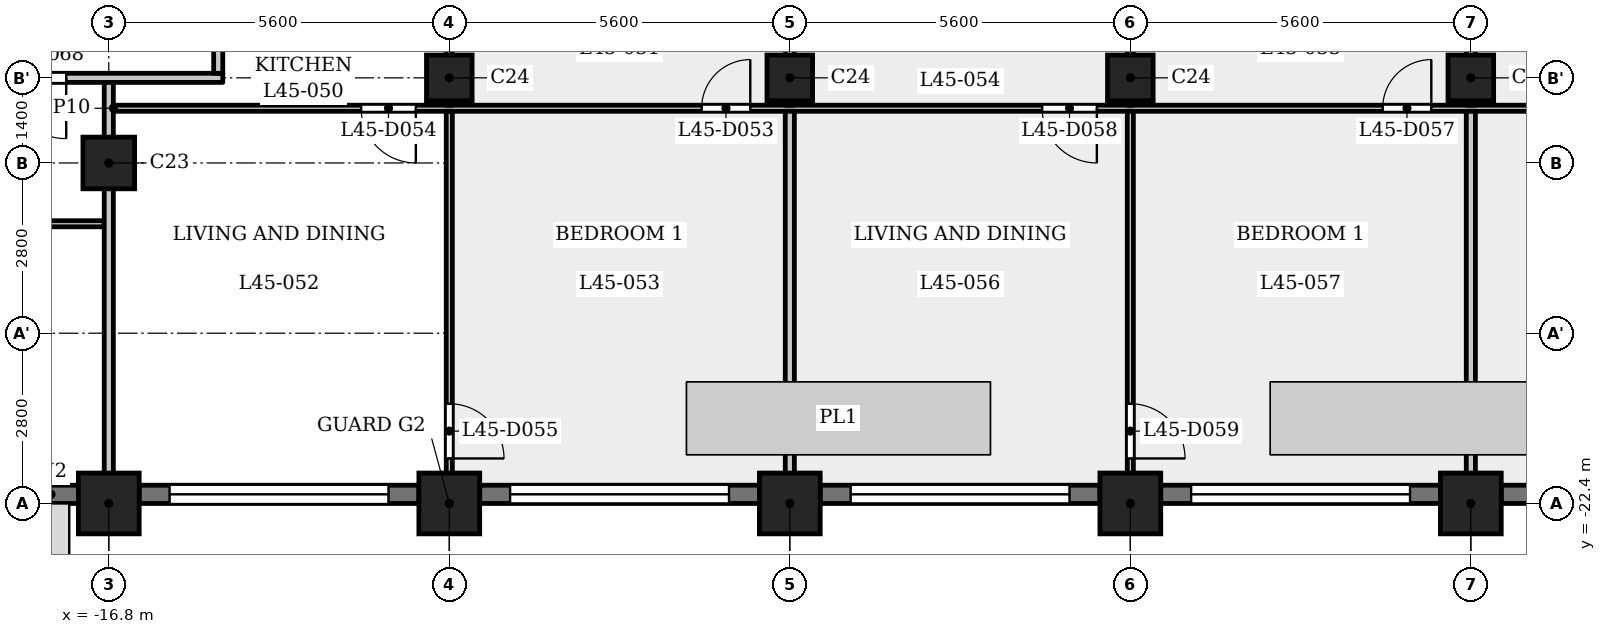
"""IFC4 building model, lengths in metres.
Left out: names, types, materials, properties, quantities, classifications, styles, units other than length and angle.
Written with IfcOpenShell. Run it as: python <this file> out.ifc"""

import sys

from ifc_helpers import new_model, si_unit, direction, frame, frame_2d, origin, origin_2d, place, context, subcontext, project, spatial, rectangle, extrude, element, fill, save


model = new_model("IFC4")
c1 = context("Model", 3, precision=1e-05, world=origin(), true_north=direction((0.0, 1.0)))
c2 = subcontext(c1, "Body", "Model", "MODEL_VIEW")
j1 = project(units=[si_unit("LENGTHUNIT", "METRE"), si_unit("PLANEANGLEUNIT", "RADIAN")], contexts=[c1])
p1 = place(None, origin())
s1 = spatial("IfcSite", under=j1, at=p1, CompositionType="ELEMENT")
p2 = place(p1, origin())
s2 = spatial("IfcBuilding", under=s1, at=p2, CompositionType="ELEMENT")
p3 = place(p2, frame((0.0, 0.0, 174.6)))
s3 = spatial("IfcBuildingStorey", under=s2, at=p3, CompositionType="ELEMENT", Elevation=174.6)
for number, where, z_axis, x_axis in (
    (1, (-16.8, -22.4, 0.0), (0.0, 0.0, 1.0), (1.0, 0.0, 0.0)),
    (2, (-11.2, -22.4, 0.0), (0.0, 0.0, 1.0), (1.0, 0.0, 0.0)),
    (3, (-5.6, -22.4, 0.0), (0.0, 0.0, 1.0), (1.0, 0.0, 0.0)),
    (4, (0.0, -22.4, 0.0), (0.0, 0.0, 1.0), (1.0, 0.0, 0.0)),
    (5, (5.6, -22.4, 0.0), (0.0, 0.0, 1.0), (1.0, 0.0, 0.0)),
):
    element("IfcColumn", number, at=place(p3, frame(where, z_axis=z_axis, x_axis=x_axis)), inside=s3, PredefinedType="COLUMN", context=c2, shape_type="SweptSolid", body=[
        extrude(rectangle(XDim=1.0, YDim=1.0, at=origin_2d()), origin(), (0.0, 0.0, 1.0), 3.5),
    ])
p4 = place(p3, frame((-16.8, -16.8, 0.0), z_axis=(0.0, 0.0, 1.0), x_axis=(1.0, 0.0, 0.0)))
e6 = element("IfcColumn", 6, at=p4, inside=s3, PredefinedType="COLUMN", context=c2, shape_type="SweptSolid", body=[
    extrude(rectangle(XDim=0.85, YDim=0.85, at=origin_2d()), origin(), (0.0, 0.0, 1.0), 3.5),
])
for number, where, z_axis, x_axis in (
    (7, (-11.2, -15.4, 0.0), (0.0, 0.0, 1.0), (1.0, 0.0, 0.0)),
    (8, (-5.6, -15.4, 0.0), (0.0, 0.0, 1.0), (1.0, 0.0, 0.0)),
    (9, (0.0, -15.4, 0.0), (0.0, 0.0, 1.0), (1.0, 0.0, 0.0)),
    (10, (5.6, -15.4, 0.0), (0.0, 0.0, 1.0), (1.0, 0.0, 0.0)),
):
    element("IfcColumn", number, at=place(p3, frame(where, z_axis=z_axis, x_axis=x_axis)), inside=s3, PredefinedType="COLUMN", context=c2, shape_type="SweptSolid", body=[
        extrude(rectangle(XDim=0.75, YDim=0.75, at=origin_2d()), origin(), (0.0, 0.0, 1.0), 3.5),
    ])
p5 = place(p3, frame((-20.0, -22.25, 0.0), z_axis=(0.0, 0.0, 1.0), x_axis=(1.0, 0.0, 0.0)))
e11 = element("IfcWall", 11, at=p5, inside=s3, PredefinedType="SOLIDWALL", context=c2, shape_type="SweptSolid", body=[
    extrude(rectangle(XDim=2.7, YDim=0.3, at=frame_2d((1.35, 0.0))), origin(), (0.0, 0.0, 1.0), 2.4),
])
p6 = place(p5, frame((0.45, 0.0, 0.9)))
e12 = element("IfcOpeningElement", 12, at=p6, cuts=e11, PredefinedType="OPENING", context=c2, shape_type="SweptSolid", body=[
    extrude(rectangle(XDim=1.8, YDim=1.25, at=frame_2d((0.9, 0.625))), frame((0.0, 0.16, 0.0), z_axis=(0.0, -1.0, 0.0), x_axis=(1.0, 0.0, 0.0)), (0.0, 0.0, 1.0), 0.32),
])
p7 = place(p3, frame((-16.3, -22.25, 0.0), z_axis=(0.0, 0.0, 1.0), x_axis=(1.0, 0.0, 0.0)))
e13 = element("IfcWall", 13, at=p7, inside=s3, PredefinedType="SOLIDWALL", context=c2, shape_type="SweptSolid", body=[
    extrude(rectangle(XDim=4.6, YDim=0.3, at=frame_2d((2.3, 0.0))), origin(), (0.0, 0.0, 1.0), 2.4),
])
p8 = place(p7, frame((0.5, 0.0, 1.2)))
e14 = element("IfcOpeningElement", 14, at=p8, cuts=e13, PredefinedType="OPENING", context=c2, shape_type="SweptSolid", body=[
    extrude(rectangle(XDim=3.6, YDim=0.95, at=frame_2d((1.8, 0.475))), frame((0.0, 0.16, 0.0), z_axis=(0.0, -1.0, 0.0), x_axis=(1.0, 0.0, 0.0)), (0.0, 0.0, 1.0), 0.32),
])
p9 = place(p3, frame((-10.7, -22.25, 0.0), z_axis=(0.0, 0.0, 1.0), x_axis=(1.0, 0.0, 0.0)))
e15 = element("IfcWall", 15, at=p9, inside=s3, PredefinedType="SOLIDWALL", context=c2, shape_type="SweptSolid", body=[
    extrude(rectangle(XDim=4.6, YDim=0.3, at=frame_2d((2.3, 0.0))), origin(), (0.0, 0.0, 1.0), 2.4),
])
p10 = place(p9, frame((0.5, 0.0, 1.2)))
e16 = element("IfcOpeningElement", 16, at=p10, cuts=e15, PredefinedType="OPENING", context=c2, shape_type="SweptSolid", body=[
    extrude(rectangle(XDim=3.6, YDim=0.95, at=frame_2d((1.8, 0.475))), frame((0.0, 0.16, 0.0), z_axis=(0.0, -1.0, 0.0), x_axis=(1.0, 0.0, 0.0)), (0.0, 0.0, 1.0), 0.32),
])
p11 = place(p3, frame((-5.1, -22.25, 0.0), z_axis=(0.0, 0.0, 1.0), x_axis=(1.0, 0.0, 0.0)))
e17 = element("IfcWall", 17, at=p11, inside=s3, PredefinedType="SOLIDWALL", context=c2, shape_type="SweptSolid", body=[
    extrude(rectangle(XDim=4.6, YDim=0.3, at=frame_2d((2.3, 0.0))), origin(), (0.0, 0.0, 1.0), 2.4),
])
p12 = place(p11, frame((0.5, 0.0, 1.2)))
e18 = element("IfcOpeningElement", 18, at=p12, cuts=e17, PredefinedType="OPENING", context=c2, shape_type="SweptSolid", body=[
    extrude(rectangle(XDim=3.6, YDim=0.95, at=frame_2d((1.8, 0.475))), frame((0.0, 0.16, 0.0), z_axis=(0.0, -1.0, 0.0), x_axis=(1.0, 0.0, 0.0)), (0.0, 0.0, 1.0), 0.32),
])
p13 = place(p3, frame((0.5, -22.25, 0.0), z_axis=(0.0, 0.0, 1.0), x_axis=(1.0, 0.0, 0.0)))
e19 = element("IfcWall", 19, at=p13, inside=s3, PredefinedType="SOLIDWALL", context=c2, shape_type="SweptSolid", body=[
    extrude(rectangle(XDim=4.6, YDim=0.3, at=frame_2d((2.3, 0.0))), origin(), (0.0, 0.0, 1.0), 2.4),
])
p14 = place(p13, frame((0.5, 0.0, 1.2)))
e20 = element("IfcOpeningElement", 20, at=p14, cuts=e19, PredefinedType="OPENING", context=c2, shape_type="SweptSolid", body=[
    extrude(rectangle(XDim=3.6, YDim=0.95, at=frame_2d((1.8, 0.475))), frame((0.0, 0.16, 0.0), z_axis=(0.0, -1.0, 0.0), x_axis=(1.0, 0.0, 0.0)), (0.0, 0.0, 1.0), 0.32),
])
p15 = place(p3, frame((6.1, -22.25, 0.0), z_axis=(0.0, 0.0, 1.0), x_axis=(1.0, 0.0, 0.0)))
e21 = element("IfcWall", 21, at=p15, inside=s3, PredefinedType="SOLIDWALL", context=c2, shape_type="SweptSolid", body=[
    extrude(rectangle(XDim=4.6, YDim=0.3, at=frame_2d((2.3, 0.0))), origin(), (0.0, 0.0, 1.0), 2.4),
])
p16 = place(p15, frame((0.5, 0.0, 1.2)))
e22 = element("IfcOpeningElement", 22, at=p16, cuts=e21, PredefinedType="OPENING", context=c2, shape_type="SweptSolid", body=[
    extrude(rectangle(XDim=3.6, YDim=0.95, at=frame_2d((1.8, 0.475))), frame((0.0, 0.16, 0.0), z_axis=(0.0, -1.0, 0.0), x_axis=(1.0, 0.0, 0.0)), (0.0, 0.0, 1.0), 0.32),
])
p17 = place(p3, frame((-26.394, -17.8, 0.0), z_axis=(0.0, 0.0, 1.0), x_axis=(1.0, 0.0, 0.0)))
e23 = element("IfcWall", 23, at=p17, inside=s3, PredefinedType="PARTITIONING", context=c2, shape_type="SweptSolid", body=[
    extrude(rectangle(XDim=9.519, YDim=0.1, at=frame_2d((4.76, 0.0))), origin(), (0.0, 0.0, 1.0), 3.15),
])
p18 = place(p17, frame((2.544, 0.0, 0.0)))
e24 = element("IfcOpeningElement", 24, at=p18, cuts=e23, PredefinedType="OPENING", context=c2, shape_type="SweptSolid", body=[
    extrude(rectangle(XDim=0.8, YDim=2.1, at=frame_2d((0.4, 1.05))), frame((0.0, 0.06, 0.0), z_axis=(0.0, -1.0, 0.0), x_axis=(1.0, 0.0, 0.0)), (0.0, 0.0, 1.0), 0.12),
])
p19 = place(p17, frame((6.894, 0.0, 0.0)))
e25 = element("IfcOpeningElement", 25, at=p19, cuts=e23, PredefinedType="OPENING", context=c2, shape_type="SweptSolid", body=[
    extrude(rectangle(XDim=0.9, YDim=2.1, at=frame_2d((0.45, 1.05))), frame((0.0, 0.06, 0.0), z_axis=(0.0, -1.0, 0.0), x_axis=(1.0, 0.0, 0.0)), (0.0, 0.0, 1.0), 0.12),
])
p20 = place(p3, frame((-16.725, -15.9, 0.0), z_axis=(0.0, 0.0, 1.0), x_axis=(1.0, 0.0, 0.0)))
e26 = element("IfcWall", 26, at=p20, inside=s3, PredefinedType="PARTITIONING", context=c2, shape_type="SweptSolid", body=[
    extrude(rectangle(XDim=33.45, YDim=0.1, at=frame_2d((16.725, 0.0))), origin(), (0.0, 0.0, 1.0), 3.15),
])
p21 = place(p20, frame((9.675, 0.0, 0.0)))
e27 = element("IfcOpeningElement", 27, at=p21, cuts=e26, PredefinedType="OPENING", context=c2, shape_type="SweptSolid", body=[
    extrude(rectangle(XDim=0.8, YDim=2.1, at=frame_2d((0.4, 1.05))), frame((0.0, 0.06, 0.0), z_axis=(0.0, -1.0, 0.0), x_axis=(1.0, 0.0, 0.0)), (0.0, 0.0, 1.0), 0.12),
])
p22 = place(p20, frame((4.075, 0.0, 0.0)))
e28 = element("IfcOpeningElement", 28, at=p22, cuts=e26, PredefinedType="OPENING", context=c2, shape_type="SweptSolid", body=[
    extrude(rectangle(XDim=0.9, YDim=2.1, at=frame_2d((0.45, 1.05))), frame((0.0, 0.06, 0.0), z_axis=(0.0, -1.0, 0.0), x_axis=(1.0, 0.0, 0.0)), (0.0, 0.0, 1.0), 0.12),
])
p23 = place(p20, frame((20.875, 0.0, 0.0)))
e29 = element("IfcOpeningElement", 29, at=p23, cuts=e26, PredefinedType="OPENING", context=c2, shape_type="SweptSolid", body=[
    extrude(rectangle(XDim=0.8, YDim=2.1, at=frame_2d((0.4, 1.05))), frame((0.0, 0.06, 0.0), z_axis=(0.0, -1.0, 0.0), x_axis=(1.0, 0.0, 0.0)), (0.0, 0.0, 1.0), 0.12),
])
p24 = place(p20, frame((15.275, 0.0, 0.0)))
e30 = element("IfcOpeningElement", 30, at=p24, cuts=e26, PredefinedType="OPENING", context=c2, shape_type="SweptSolid", body=[
    extrude(rectangle(XDim=0.9, YDim=2.1, at=frame_2d((0.45, 1.05))), frame((0.0, 0.06, 0.0), z_axis=(0.0, -1.0, 0.0), x_axis=(1.0, 0.0, 0.0)), (0.0, 0.0, 1.0), 0.12),
])
p25 = place(p20, frame((30.825, 0.0, 0.0)))
e31 = element("IfcOpeningElement", 31, at=p25, cuts=e26, PredefinedType="OPENING", context=c2, shape_type="SweptSolid", body=[
    extrude(rectangle(XDim=0.8, YDim=2.1, at=frame_2d((0.4, 1.05))), frame((0.0, 0.06, 0.0), z_axis=(0.0, -1.0, 0.0), x_axis=(1.0, 0.0, 0.0)), (0.0, 0.0, 1.0), 0.12),
])
p26 = place(p20, frame((26.475, 0.0, 0.0)))
e32 = element("IfcOpeningElement", 32, at=p26, cuts=e26, PredefinedType="OPENING", context=c2, shape_type="SweptSolid", body=[
    extrude(rectangle(XDim=0.9, YDim=2.1, at=frame_2d((0.45, 1.05))), frame((0.0, 0.06, 0.0), z_axis=(0.0, -1.0, 0.0), x_axis=(1.0, 0.0, 0.0)), (0.0, 0.0, 1.0), 0.12),
])
p27 = place(p3, frame((-27.484, -15.4, 0.0), z_axis=(0.0, 0.0, 1.0), x_axis=(1.0, 0.0, 0.0)))
e33 = element("IfcWall", 33, at=p27, inside=s3, PredefinedType="PARTITIONING", context=c2, shape_type="SweptSolid", body=[
    extrude(rectangle(XDim=12.559, YDim=0.15, at=frame_2d((6.279, 0.0))), origin(), (0.0, 0.0, 1.0), 3.15),
])
p28 = place(p27, frame((8.984, 0.0, 0.0)))
e34 = element("IfcOpeningElement", 34, at=p28, cuts=e33, PredefinedType="OPENING", context=c2, shape_type="SweptSolid", body=[
    extrude(rectangle(XDim=1.0, YDim=2.1, at=frame_2d((0.5, 1.05))), frame((0.0, 0.085, 0.0), z_axis=(0.0, -1.0, 0.0), x_axis=(1.0, 0.0, 0.0)), (0.0, 0.0, 1.0), 0.17),
])
p29 = place(p3, frame((-16.8, -22.88, 0.0), z_axis=(0.0, 0.0, 1.0), x_axis=(0.0, 1.0, 0.0)))
e35 = element("IfcWall", 35, at=p29, inside=s3, PredefinedType="PARTITIONING", context=c2, shape_type="SweptSolid", body=[
    extrude(rectangle(XDim=7.405, YDim=0.15, at=frame_2d((3.702, 0.0))), origin(), (0.0, 0.0, 1.0), 3.15),
])
p30 = place(p3, frame((-15.0, -15.325, 0.0), z_axis=(0.0, 0.0, 1.0), x_axis=(0.0, 1.0, 0.0)))
e36 = element("IfcWall", 36, at=p30, inside=s3, PredefinedType="PARTITIONING", context=c2, shape_type="SweptSolid", body=[
    extrude(rectangle(XDim=2.05, YDim=0.15, at=frame_2d((1.025, 0.0))), origin(), (0.0, 0.0, 1.0), 3.15),
])
p31 = place(p30, frame((0.574, 0.0, 0.0)))
e37 = element("IfcOpeningElement", 37, at=p31, cuts=e36, PredefinedType="OPENING", context=c2, shape_type="SweptSolid", body=[
    extrude(rectangle(XDim=1.0, YDim=2.1, at=frame_2d((0.5, 1.05))), frame((0.0, 0.085, 0.0), z_axis=(0.0, -1.0, 0.0), x_axis=(1.0, 0.0, 0.0)), (0.0, 0.0, 1.0), 0.17),
])
p32 = place(p3, frame((-11.2, -22.88, 0.0), z_axis=(0.0, 0.0, 1.0), x_axis=(0.0, 1.0, 0.0)))
e38 = element("IfcWall", 38, at=p32, inside=s3, PredefinedType="PARTITIONING", context=c2, shape_type="SweptSolid", body=[
    extrude(rectangle(XDim=6.93, YDim=0.1, at=frame_2d((3.465, 0.0))), origin(), (0.0, 0.0, 1.0), 3.15),
])
p33 = place(p32, frame((1.22, 0.0, 0.0)))
e39 = element("IfcOpeningElement", 39, at=p33, cuts=e38, PredefinedType="OPENING", context=c2, shape_type="SweptSolid", body=[
    extrude(rectangle(XDim=0.9, YDim=2.1, at=frame_2d((0.45, 1.05))), frame((0.0, 0.06, 0.0), z_axis=(0.0, -1.0, 0.0), x_axis=(1.0, 0.0, 0.0)), (0.0, 0.0, 1.0), 0.12),
])
p34 = place(p3, frame((-11.2, -15.85, 0.0), z_axis=(0.0, 0.0, 1.0), x_axis=(0.0, 1.0, 0.0)))
e40 = element("IfcWall", 40, at=p34, inside=s3, PredefinedType="PARTITIONING", context=c2, shape_type="SweptSolid", body=[
    extrude(rectangle(XDim=2.575, YDim=0.1, at=frame_2d((1.288, 0.0))), origin(), (0.0, 0.0, 1.0), 3.15),
])
p35 = place(p3, frame((-5.6, -22.88, 0.0), z_axis=(0.0, 0.0, 1.0), x_axis=(0.0, 1.0, 0.0)))
e41 = element("IfcWall", 41, at=p35, inside=s3, PredefinedType="PARTITIONING", context=c2, shape_type="SweptSolid", body=[
    extrude(rectangle(XDim=6.93, YDim=0.15, at=frame_2d((3.465, 0.0))), origin(), (0.0, 0.0, 1.0), 3.15),
])
p36 = place(p3, frame((-5.6, -15.85, 0.0), z_axis=(0.0, 0.0, 1.0), x_axis=(0.0, 1.0, 0.0)))
e42 = element("IfcWall", 42, at=p36, inside=s3, PredefinedType="PARTITIONING", context=c2, shape_type="SweptSolid", body=[
    extrude(rectangle(XDim=2.575, YDim=0.15, at=frame_2d((1.288, 0.0))), origin(), (0.0, 0.0, 1.0), 3.15),
])
p37 = place(p3, frame((0.0, -22.88, 0.0), z_axis=(0.0, 0.0, 1.0), x_axis=(0.0, 1.0, 0.0)))
e43 = element("IfcWall", 43, at=p37, inside=s3, PredefinedType="PARTITIONING", context=c2, shape_type="SweptSolid", body=[
    extrude(rectangle(XDim=6.93, YDim=0.1, at=frame_2d((3.465, 0.0))), origin(), (0.0, 0.0, 1.0), 3.15),
])
p38 = place(p37, frame((1.22, 0.0, 0.0)))
e44 = element("IfcOpeningElement", 44, at=p38, cuts=e43, PredefinedType="OPENING", context=c2, shape_type="SweptSolid", body=[
    extrude(rectangle(XDim=0.9, YDim=2.1, at=frame_2d((0.45, 1.05))), frame((0.0, 0.06, 0.0), z_axis=(0.0, -1.0, 0.0), x_axis=(1.0, 0.0, 0.0)), (0.0, 0.0, 1.0), 0.12),
])
p39 = place(p3, frame((0.0, -15.85, 0.0), z_axis=(0.0, 0.0, 1.0), x_axis=(0.0, 1.0, 0.0)))
e45 = element("IfcWall", 45, at=p39, inside=s3, PredefinedType="PARTITIONING", context=c2, shape_type="SweptSolid", body=[
    extrude(rectangle(XDim=2.575, YDim=0.1, at=frame_2d((1.288, 0.0))), origin(), (0.0, 0.0, 1.0), 3.15),
])
p40 = place(p3, frame((5.6, -22.88, 0.0), z_axis=(0.0, 0.0, 1.0), x_axis=(0.0, 1.0, 0.0)))
e46 = element("IfcWall", 46, at=p40, inside=s3, PredefinedType="PARTITIONING", context=c2, shape_type="SweptSolid", body=[
    extrude(rectangle(XDim=6.93, YDim=0.15, at=frame_2d((3.465, 0.0))), origin(), (0.0, 0.0, 1.0), 3.15),
])
p41 = place(p3, frame((5.6, -15.85, 0.0), z_axis=(0.0, 0.0, 1.0), x_axis=(0.0, 1.0, 0.0)))
e47 = element("IfcWall", 47, at=p41, inside=s3, PredefinedType="PARTITIONING", context=c2, shape_type="SweptSolid", body=[
    extrude(rectangle(XDim=2.575, YDim=0.15, at=frame_2d((1.288, 0.0))), origin(), (0.0, 0.0, 1.0), 3.15),
])
p42 = place(p21, origin())
e48 = element("IfcDoor", 48, at=p42, inside=s3, OperationType="SINGLE_SWING_LEFT", PredefinedType="DOOR", context=c2, shape_type="SweptSolid", body=[
    extrude(rectangle(XDim=0.8, YDim=2.1, at=frame_2d((0.4, 1.05))), frame((0.0, 0.025, 0.0), z_axis=(0.0, -1.0, 0.0), x_axis=(1.0, 0.0, 0.0)), (0.0, 0.0, 1.0), 0.05),
])
fill(e27, e48)
p43 = place(p22, origin())
e49 = element("IfcDoor", 49, at=p43, inside=s3, OperationType="SINGLE_SWING_RIGHT", PredefinedType="DOOR", context=c2, shape_type="SweptSolid", body=[
    extrude(rectangle(XDim=0.9, YDim=2.1, at=frame_2d((0.45, 1.05))), frame((0.0, 0.025, 0.0), z_axis=(0.0, -1.0, 0.0), x_axis=(1.0, 0.0, 0.0)), (0.0, 0.0, 1.0), 0.05),
])
fill(e28, e49)
p44 = place(p33, origin())
e50 = element("IfcDoor", 50, at=p44, inside=s3, OperationType="SINGLE_SWING_LEFT", PredefinedType="DOOR", context=c2, shape_type="SweptSolid", body=[
    extrude(rectangle(XDim=0.9, YDim=2.1, at=frame_2d((0.45, 1.05))), frame((0.0, 0.025, 0.0), z_axis=(0.0, -1.0, 0.0), x_axis=(1.0, 0.0, 0.0)), (0.0, 0.0, 1.0), 0.05),
])
fill(e39, e50)
p45 = place(p23, origin())
e51 = element("IfcDoor", 51, at=p45, inside=s3, OperationType="SINGLE_SWING_LEFT", PredefinedType="DOOR", context=c2, shape_type="SweptSolid", body=[
    extrude(rectangle(XDim=0.8, YDim=2.1, at=frame_2d((0.4, 1.05))), frame((0.0, 0.025, 0.0), z_axis=(0.0, -1.0, 0.0), x_axis=(1.0, 0.0, 0.0)), (0.0, 0.0, 1.0), 0.05),
])
fill(e29, e51)
p46 = place(p24, origin())
e52 = element("IfcDoor", 52, at=p46, inside=s3, OperationType="SINGLE_SWING_RIGHT", PredefinedType="DOOR", context=c2, shape_type="SweptSolid", body=[
    extrude(rectangle(XDim=0.9, YDim=2.1, at=frame_2d((0.45, 1.05))), frame((0.0, 0.025, 0.0), z_axis=(0.0, -1.0, 0.0), x_axis=(1.0, 0.0, 0.0)), (0.0, 0.0, 1.0), 0.05),
])
fill(e30, e52)
p47 = place(p38, origin())
e53 = element("IfcDoor", 53, at=p47, inside=s3, OperationType="SINGLE_SWING_LEFT", PredefinedType="DOOR", context=c2, shape_type="SweptSolid", body=[
    extrude(rectangle(XDim=0.9, YDim=2.1, at=frame_2d((0.45, 1.05))), frame((0.0, 0.025, 0.0), z_axis=(0.0, -1.0, 0.0), x_axis=(1.0, 0.0, 0.0)), (0.0, 0.0, 1.0), 0.05),
])
fill(e44, e53)
p48 = place(p28, origin())
e54 = element("IfcDoor", 54, at=p48, inside=s3, OperationType="SINGLE_SWING_RIGHT", PredefinedType="DOOR", context=c2, shape_type="SweptSolid", body=[
    extrude(rectangle(XDim=1.0, YDim=2.1, at=frame_2d((0.5, 1.05))), frame((0.0, 0.025, 0.0), z_axis=(0.0, -1.0, 0.0), x_axis=(1.0, 0.0, 0.0)), (0.0, 0.0, 1.0), 0.05),
])
fill(e34, e54)
p49 = place(p8, origin())
e55 = element("IfcWindow", 55, at=p49, inside=s3, PartitioningType="SINGLE_PANEL", PredefinedType="WINDOW", context=c2, shape_type="SweptSolid", body=[
    extrude(rectangle(XDim=3.6, YDim=0.95, at=frame_2d((1.8, 0.475))), frame((0.0, 0.03, 0.0), z_axis=(0.0, -1.0, 0.0), x_axis=(1.0, 0.0, 0.0)), (0.0, 0.0, 1.0), 0.06),
])
fill(e14, e55)
p50 = place(p10, origin())
e56 = element("IfcWindow", 56, at=p50, inside=s3, PartitioningType="SINGLE_PANEL", PredefinedType="WINDOW", context=c2, shape_type="SweptSolid", body=[
    extrude(rectangle(XDim=3.6, YDim=0.95, at=frame_2d((1.8, 0.475))), frame((0.0, 0.03, 0.0), z_axis=(0.0, -1.0, 0.0), x_axis=(1.0, 0.0, 0.0)), (0.0, 0.0, 1.0), 0.06),
])
fill(e16, e56)
p51 = place(p12, origin())
e57 = element("IfcWindow", 57, at=p51, inside=s3, PartitioningType="SINGLE_PANEL", PredefinedType="WINDOW", context=c2, shape_type="SweptSolid", body=[
    extrude(rectangle(XDim=3.6, YDim=0.95, at=frame_2d((1.8, 0.475))), frame((0.0, 0.03, 0.0), z_axis=(0.0, -1.0, 0.0), x_axis=(1.0, 0.0, 0.0)), (0.0, 0.0, 1.0), 0.06),
])
fill(e18, e57)
p52 = place(p14, origin())
e58 = element("IfcWindow", 58, at=p52, inside=s3, PartitioningType="SINGLE_PANEL", PredefinedType="WINDOW", context=c2, shape_type="SweptSolid", body=[
    extrude(rectangle(XDim=3.6, YDim=0.95, at=frame_2d((1.8, 0.475))), frame((0.0, 0.03, 0.0), z_axis=(0.0, -1.0, 0.0), x_axis=(1.0, 0.0, 0.0)), (0.0, 0.0, 1.0), 0.06),
])
fill(e20, e58)
save(model, sys.argv[1])
